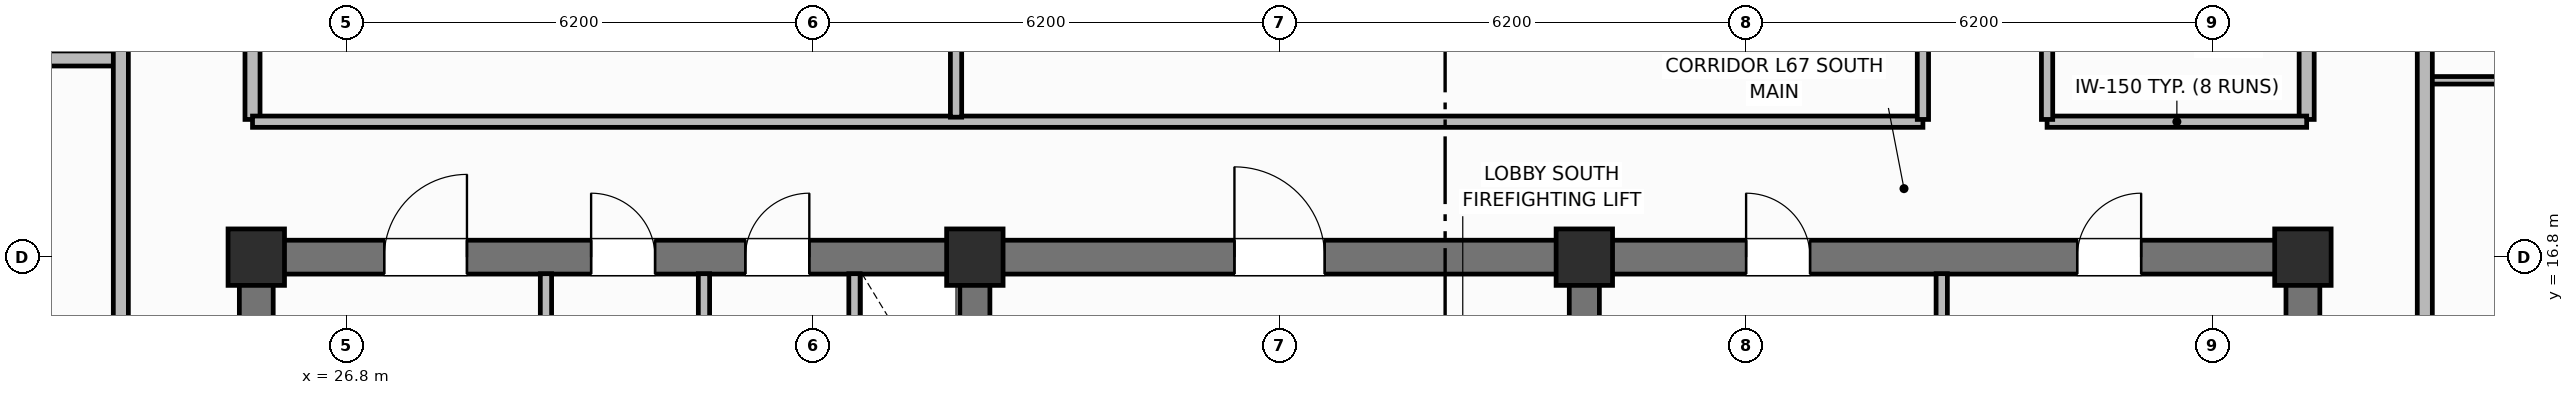
"""IFC4 building model, lengths in metres.
Left out: names, types, materials, properties, quantities, classifications, styles, units other than length and angle.
Written with IfcOpenShell. Run it as: python <this file> out.ifc"""

import sys

from ifc_helpers import new_model, si_unit, direction, frame, frame_2d, origin, origin_2d, place, context, subcontext, project, spatial, rectangle, extrude, element, fill, save


model = new_model("IFC4")
c1 = context("Model", 3, precision=1e-05, world=origin(), true_north=direction((0.0, 1.0)))
c2 = subcontext(c1, "Body", "Model", "MODEL_VIEW")
j1 = project(units=[si_unit("LENGTHUNIT", "METRE"), si_unit("PLANEANGLEUNIT", "RADIAN")], contexts=[c1])
p1 = place(None, origin())
s1 = spatial("IfcSite", under=j1, at=p1, CompositionType="ELEMENT")
p2 = place(p1, origin())
s2 = spatial("IfcBuilding", under=s1, at=p2, CompositionType="ELEMENT")
p3 = place(p2, frame((0.0, 0.0, 267.6)))
s3 = spatial("IfcBuildingStorey", under=s2, at=p3, CompositionType="ELEMENT", Elevation=267.6)
for number, where, z_axis, x_axis in (
    (1, (25.6, 10.825, 0.0), (0.0, 0.0, 1.0), (0.0, 1.0, 0.0)),
    (2, (52.8, 10.825, 0.0), (0.0, 0.0, 1.0), (0.0, 1.0, 0.0)),
):
    element("IfcWall", number, at=place(p3, frame(where, z_axis=z_axis, x_axis=x_axis)), inside=s3, PredefinedType="SHEAR", context=c2, shape_type="SweptSolid", body=[
        extrude(rectangle(XDim=5.75, YDim=0.45, at=frame_2d((2.875, 0.0))), origin(), (0.0, 0.0, 1.0), 3.7),
    ])
p4 = place(p3, frame((25.6, 16.8, 0.0), z_axis=(0.0, 0.0, 1.0), x_axis=(1.0, 0.0, 0.0)))
e3 = element("IfcWall", 3, at=p4, inside=s3, PredefinedType="SHEAR", context=c2, shape_type="SweptSolid", body=[
    extrude(rectangle(XDim=27.2, YDim=0.45, at=frame_2d((13.6, 0.0))), origin(), (0.0, 0.0, 1.0), 3.7),
])
p5 = place(p4, frame((1.7, 0.0, 0.0)))
e4 = element("IfcOpeningElement", 4, at=p5, cuts=e3, PredefinedType="OPENING", context=c2, shape_type="SweptSolid", body=[
    extrude(rectangle(XDim=1.1, YDim=2.15, at=frame_2d((0.55, 1.075))), frame((0.0, 0.235, 0.0), z_axis=(0.0, -1.0, 0.0), x_axis=(1.0, 0.0, 0.0)), (0.0, 0.0, 1.0), 0.47),
])
p6 = place(p4, frame((4.45, 0.0, 0.0)))
e5 = element("IfcOpeningElement", 5, at=p6, cuts=e3, PredefinedType="OPENING", context=c2, shape_type="SweptSolid", body=[
    extrude(rectangle(XDim=0.85, YDim=2.1, at=frame_2d((0.425, 1.05))), frame((0.0, 0.235, 0.0), z_axis=(0.0, -1.0, 0.0), x_axis=(1.0, 0.0, 0.0)), (0.0, 0.0, 1.0), 0.47),
])
p7 = place(p4, frame((6.5, 0.0, 0.0)))
e6 = element("IfcOpeningElement", 6, at=p7, cuts=e3, PredefinedType="OPENING", context=c2, shape_type="SweptSolid", body=[
    extrude(rectangle(XDim=0.85, YDim=2.1, at=frame_2d((0.425, 1.05))), frame((0.0, 0.235, 0.0), z_axis=(0.0, -1.0, 0.0), x_axis=(1.0, 0.0, 0.0)), (0.0, 0.0, 1.0), 0.47),
])
p8 = place(p4, frame((13.0, 0.0, 0.0)))
e7 = element("IfcOpeningElement", 7, at=p8, cuts=e3, PredefinedType="OPENING", context=c2, shape_type="SweptSolid", body=[
    extrude(rectangle(XDim=1.2, YDim=2.15, at=frame_2d((0.6, 1.075))), frame((0.0, 0.235, 0.0), z_axis=(0.0, -1.0, 0.0), x_axis=(1.0, 0.0, 0.0)), (0.0, 0.0, 1.0), 0.47),
])
p9 = place(p4, frame((19.8, 0.0, 0.0)))
e8 = element("IfcOpeningElement", 8, at=p9, cuts=e3, PredefinedType="OPENING", context=c2, shape_type="SweptSolid", body=[
    extrude(rectangle(XDim=0.85, YDim=2.1, at=frame_2d((0.425, 1.05))), frame((0.0, 0.235, 0.0), z_axis=(0.0, -1.0, 0.0), x_axis=(1.0, 0.0, 0.0)), (0.0, 0.0, 1.0), 0.47),
])
p10 = place(p4, frame((24.2, 0.0, 0.0)))
e9 = element("IfcOpeningElement", 9, at=p10, cuts=e3, PredefinedType="OPENING", context=c2, shape_type="SweptSolid", body=[
    extrude(rectangle(XDim=0.85, YDim=2.1, at=frame_2d((0.425, 1.05))), frame((0.0, 0.235, 0.0), z_axis=(0.0, -1.0, 0.0), x_axis=(1.0, 0.0, 0.0)), (0.0, 0.0, 1.0), 0.47),
])
for number, where, z_axis, x_axis in (
    (10, (35.15, 10.825, 0.0), (0.0, 0.0, 1.0), (0.0, 1.0, 0.0)),
    (11, (43.25, 10.825, 0.0), (0.0, 0.0, 1.0), (0.0, 1.0, 0.0)),
):
    element("IfcWall", number, at=place(p3, frame(where, z_axis=z_axis, x_axis=x_axis)), inside=s3, PredefinedType="SHEAR", context=c2, shape_type="SweptSolid", body=[
        extrude(rectangle(XDim=5.75, YDim=0.4, at=frame_2d((2.875, 0.0))), origin(), (0.0, 0.0, 1.0), 3.7),
    ])
for number, where, z_axis, x_axis in (
    (12, (25.6, 16.8, 0.0), (0.0, 0.0, 1.0), (1.0, 0.0, 0.0)),
    (13, (35.15, 16.8, 0.0), (0.0, 0.0, 1.0), (1.0, 0.0, 0.0)),
    (14, (43.25, 16.8, 0.0), (0.0, 0.0, 1.0), (1.0, 0.0, 0.0)),
    (15, (52.8, 16.8, 0.0), (0.0, 0.0, 1.0), (1.0, 0.0, 0.0)),
):
    element("IfcColumn", number, at=place(p3, frame(where, z_axis=z_axis, x_axis=x_axis)), inside=s3, PredefinedType="COLUMN", context=c2, shape_type="SweptSolid", body=[
        extrude(rectangle(XDim=0.75, YDim=0.75, at=origin_2d()), origin(), (0.0, 0.0, 1.0), 3.7),
    ])
for number, where, z_axis, x_axis in (
    (16, (29.45, 14.5, 0.0), (0.0, 0.0, 1.0), (0.0, 1.0, 0.0)),
    (17, (31.55, 14.5, 0.0), (0.0, 0.0, 1.0), (0.0, 1.0, 0.0)),
):
    element("IfcWall", number, at=place(p3, frame(where, z_axis=z_axis, x_axis=x_axis)), inside=s3, PredefinedType="PARTITIONING", context=c2, shape_type="SweptSolid", body=[
        extrude(rectangle(XDim=2.08, YDim=0.15, at=frame_2d((1.04, 0.0))), origin(), (0.0, 0.0, 1.0), 2.56),
    ])
p11 = place(p3, frame((33.55, 14.5, 0.0), z_axis=(0.0, 0.0, 1.0), x_axis=(0.0, 1.0, 0.0)))
e18 = element("IfcWall", 18, at=p11, inside=s3, PredefinedType="PARTITIONING", context=c2, shape_type="SweptSolid", body=[
    extrude(rectangle(XDim=2.08, YDim=0.15, at=frame_2d((1.04, 0.0))), origin(), (0.0, 0.0, 1.0), 2.56),
])
p12 = place(p11, frame((0.55, 0.0, 0.0)))
e19 = element("IfcOpeningElement", 19, at=p12, cuts=e18, PredefinedType="OPENING", context=c2, shape_type="SweptSolid", body=[
    extrude(rectangle(XDim=0.85, YDim=2.05, at=frame_2d((0.425, 1.025))), frame((0.0, 0.085, 0.0), z_axis=(0.0, -1.0, 0.0), x_axis=(1.0, 0.0, 0.0)), (0.0, 0.0, 1.0), 0.17),
])
p13 = place(p3, frame((48.0, 10.95, 0.0), z_axis=(0.0, 0.0, 1.0), x_axis=(0.0, 1.0, 0.0)))
e20 = element("IfcWall", 20, at=p13, inside=s3, PredefinedType="PARTITIONING", context=c2, shape_type="SweptSolid", body=[
    extrude(rectangle(XDim=5.63, YDim=0.15, at=frame_2d((2.815, 0.0))), origin(), (0.0, 0.0, 1.0), 2.56),
])
for number, where, z_axis, x_axis in (
    (21, (25.55, 18.63, 0.0), (0.0, 0.0, 1.0), (0.0, 1.0, 0.0)),
    (22, (52.85, 18.63, 0.0), (0.0, 0.0, 1.0), (0.0, 1.0, 0.0)),
):
    element("IfcWall", number, at=place(p3, frame(where, z_axis=z_axis, x_axis=x_axis)), inside=s3, PredefinedType="PARTITIONING", context=c2, shape_type="SweptSolid", body=[
        extrude(rectangle(XDim=19.14, YDim=0.2, at=frame_2d((9.57, 0.0))), origin(), (0.0, 0.0, 1.0), 2.56),
    ])
p14 = place(p3, frame((25.55, 18.6, 0.0), z_axis=(0.0, 0.0, 1.0), x_axis=(1.0, 0.0, 0.0)))
e23 = element("IfcWall", 23, at=p14, inside=s3, PredefinedType="PARTITIONING", context=c2, shape_type="SweptSolid", body=[
    extrude(rectangle(XDim=22.2, YDim=0.15, at=frame_2d((11.1, 0.0))), origin(), (0.0, 0.0, 1.0), 2.56),
])
p15 = place(p3, frame((49.4, 18.6, 0.0), z_axis=(0.0, 0.0, 1.0), x_axis=(1.0, 0.0, 0.0)))
e24 = element("IfcWall", 24, at=p15, inside=s3, PredefinedType="PARTITIONING", context=c2, shape_type="SweptSolid", body=[
    extrude(rectangle(XDim=3.45, YDim=0.15, at=frame_2d((1.725, 0.0))), origin(), (0.0, 0.0, 1.0), 2.56),
])
p16 = place(p3, frame((34.9, 18.66, 0.0), z_axis=(0.0, 0.0, 1.0), x_axis=(0.0, 1.0, 0.0)))
e25 = element("IfcWall", 25, at=p16, inside=s3, PredefinedType="PARTITIONING", context=c2, shape_type="SweptSolid", body=[
    extrude(rectangle(XDim=19.08, YDim=0.15, at=frame_2d((9.54, 0.0))), origin(), (0.0, 0.0, 1.0), 2.56),
])
p17 = place(p16, frame((5.0, 0.0, 0.0)))
e26 = element("IfcOpeningElement", 26, at=p17, cuts=e25, PredefinedType="OPENING", context=c2, shape_type="SweptSolid", body=[
    extrude(rectangle(XDim=1.0, YDim=2.15, at=frame_2d((0.5, 1.075))), frame((0.0, 0.085, 0.0), z_axis=(0.0, -1.0, 0.0), x_axis=(1.0, 0.0, 0.0)), (0.0, 0.0, 1.0), 0.17),
])
p18 = place(p3, frame((47.75, 18.63, 0.0), z_axis=(0.0, 0.0, 1.0), x_axis=(0.0, 1.0, 0.0)))
e27 = element("IfcWall", 27, at=p18, inside=s3, PredefinedType="PARTITIONING", context=c2, shape_type="SweptSolid", body=[
    extrude(rectangle(XDim=19.14, YDim=0.15, at=frame_2d((9.57, 0.0))), origin(), (0.0, 0.0, 1.0), 2.56),
])
p19 = place(p18, frame((2.4, 0.0, 0.0)))
e28 = element("IfcOpeningElement", 28, at=p19, cuts=e27, PredefinedType="OPENING", context=c2, shape_type="SweptSolid", body=[
    extrude(rectangle(XDim=0.9, YDim=2.1, at=frame_2d((0.45, 1.05))), frame((0.0, 0.085, 0.0), z_axis=(0.0, -1.0, 0.0), x_axis=(1.0, 0.0, 0.0)), (0.0, 0.0, 1.0), 0.17),
])
p20 = place(p18, frame((10.804, 0.0, 0.0)))
e29 = element("IfcOpeningElement", 29, at=p20, cuts=e27, PredefinedType="OPENING", context=c2, shape_type="SweptSolid", body=[
    extrude(rectangle(XDim=0.9, YDim=2.1, at=frame_2d((0.45, 1.05))), frame((0.0, 0.085, 0.0), z_axis=(0.0, -1.0, 0.0), x_axis=(1.0, 0.0, 0.0)), (0.0, 0.0, 1.0), 0.17),
])
p21 = place(p3, frame((49.4, 18.63, 0.0), z_axis=(0.0, 0.0, 1.0), x_axis=(0.0, 1.0, 0.0)))
e30 = element("IfcWall", 30, at=p21, inside=s3, PredefinedType="PARTITIONING", context=c2, shape_type="SweptSolid", body=[
    extrude(rectangle(XDim=19.14, YDim=0.15, at=frame_2d((9.57, 0.0))), origin(), (0.0, 0.0, 1.0), 2.56),
])
p22 = place(p21, frame((2.4, 0.0, 0.0)))
e31 = element("IfcOpeningElement", 31, at=p22, cuts=e30, PredefinedType="OPENING", context=c2, shape_type="SweptSolid", body=[
    extrude(rectangle(XDim=1.0, YDim=2.15, at=frame_2d((0.5, 1.075))), frame((0.0, 0.085, 0.0), z_axis=(0.0, -1.0, 0.0), x_axis=(1.0, 0.0, 0.0)), (0.0, 0.0, 1.0), 0.17),
])
p23 = place(p21, frame((10.804, 0.0, 0.0)))
e32 = element("IfcOpeningElement", 32, at=p23, cuts=e30, PredefinedType="OPENING", context=c2, shape_type="SweptSolid", body=[
    extrude(rectangle(XDim=1.0, YDim=2.15, at=frame_2d((0.5, 1.075))), frame((0.0, 0.085, 0.0), z_axis=(0.0, -1.0, 0.0), x_axis=(1.0, 0.0, 0.0)), (0.0, 0.0, 1.0), 0.17),
])
p24 = place(p3, frame((19.53, 19.44, 0.0), z_axis=(0.0, 0.0, 1.0), x_axis=(1.0, 0.0, 0.0)))
e33 = element("IfcWall", 33, at=p24, inside=s3, PredefinedType="PARTITIONING", context=c2, shape_type="SweptSolid", body=[
    extrude(rectangle(XDim=4.27, YDim=0.2, at=frame_2d((2.135, 0.0))), origin(), (0.0, 0.0, 1.0), 2.56),
])
p25 = place(p3, frame((23.8, 9.95, 0.0), z_axis=(0.0, 0.0, 1.0), x_axis=(0.0, 1.0, 0.0)))
e34 = element("IfcWall", 34, at=p25, inside=s3, PredefinedType="PARTITIONING", context=c2, shape_type="SweptSolid", body=[
    extrude(rectangle(XDim=36.5, YDim=0.2, at=frame_2d((18.25, 0.0))), origin(), (0.0, 0.0, 1.0), 2.56),
])
p26 = place(p25, frame((3.11, 0.0, 0.0)))
e35 = element("IfcOpeningElement", 35, at=p26, cuts=e34, PredefinedType="OPENING", context=c2, shape_type="SweptSolid", body=[
    extrude(rectangle(XDim=1.0, YDim=2.15, at=frame_2d((0.5, 1.075))), frame((0.0, 0.11, 0.0), z_axis=(0.0, -1.0, 0.0), x_axis=(1.0, 0.0, 0.0)), (0.0, 0.0, 1.0), 0.22),
])
p27 = place(p25, frame((11.99, 0.0, 0.0)))
e36 = element("IfcOpeningElement", 36, at=p27, cuts=e34, PredefinedType="OPENING", context=c2, shape_type="SweptSolid", body=[
    extrude(rectangle(XDim=1.0, YDim=2.15, at=frame_2d((0.5, 1.075))), frame((0.0, 0.11, 0.0), z_axis=(0.0, -1.0, 0.0), x_axis=(1.0, 0.0, 0.0)), (0.0, 0.0, 1.0), 0.22),
])
p28 = place(p25, frame((23.5, 0.0, 0.0)))
e37 = element("IfcOpeningElement", 37, at=p28, cuts=e34, PredefinedType="OPENING", context=c2, shape_type="SweptSolid", body=[
    extrude(rectangle(XDim=1.0, YDim=2.15, at=frame_2d((0.5, 1.075))), frame((0.0, 0.11, 0.0), z_axis=(0.0, -1.0, 0.0), x_axis=(1.0, 0.0, 0.0)), (0.0, 0.0, 1.0), 0.22),
])
p29 = place(p25, frame((31.2, 0.0, 0.0)))
e38 = element("IfcOpeningElement", 38, at=p29, cuts=e34, PredefinedType="OPENING", context=c2, shape_type="SweptSolid", body=[
    extrude(rectangle(XDim=1.0, YDim=2.15, at=frame_2d((0.5, 1.075))), frame((0.0, 0.11, 0.0), z_axis=(0.0, -1.0, 0.0), x_axis=(1.0, 0.0, 0.0)), (0.0, 0.0, 1.0), 0.22),
])
p30 = place(p3, frame((54.42, 19.15, 0.0), z_axis=(0.0, 0.0, 1.0), x_axis=(1.0, 0.0, 0.0)))
e39 = element("IfcWall", 39, at=p30, inside=s3, PredefinedType="PARTITIONING", context=c2, shape_type="SweptSolid", body=[
    extrude(rectangle(XDim=1.95, YDim=0.1, at=frame_2d((0.975, 0.0))), origin(), (0.0, 0.0, 1.0), 2.56),
])
p31 = place(p3, frame((54.42, 9.95, 0.0), z_axis=(0.0, 0.0, 1.0), x_axis=(0.0, 1.0, 0.0)))
e40 = element("IfcWall", 40, at=p31, inside=s3, PredefinedType="PARTITIONING", context=c2, shape_type="SweptSolid", body=[
    extrude(rectangle(XDim=36.5, YDim=0.2, at=frame_2d((18.25, 0.0))), origin(), (0.0, 0.0, 1.0), 2.56),
])
p32 = place(p31, frame((3.25, 0.0, 0.0)))
e41 = element("IfcOpeningElement", 41, at=p32, cuts=e40, PredefinedType="OPENING", context=c2, shape_type="SweptSolid", body=[
    extrude(rectangle(XDim=1.0, YDim=2.15, at=frame_2d((0.5, 1.075))), frame((0.0, 0.11, 0.0), z_axis=(0.0, -1.0, 0.0), x_axis=(1.0, 0.0, 0.0)), (0.0, 0.0, 1.0), 0.22),
])
p33 = place(p31, frame((14.25, 0.0, 0.0)))
e42 = element("IfcOpeningElement", 42, at=p33, cuts=e40, PredefinedType="OPENING", context=c2, shape_type="SweptSolid", body=[
    extrude(rectangle(XDim=1.0, YDim=2.15, at=frame_2d((0.5, 1.075))), frame((0.0, 0.11, 0.0), z_axis=(0.0, -1.0, 0.0), x_axis=(1.0, 0.0, 0.0)), (0.0, 0.0, 1.0), 0.22),
])
p34 = place(p5, origin())
e43 = element("IfcDoor", 43, at=p34, inside=s3, OperationType="SINGLE_SWING_RIGHT", PredefinedType="DOOR", context=c2, shape_type="SweptSolid", body=[
    extrude(rectangle(XDim=1.1, YDim=2.15, at=frame_2d((0.55, 1.075))), frame((0.0, 0.025, 0.0), z_axis=(0.0, -1.0, 0.0), x_axis=(1.0, 0.0, 0.0)), (0.0, 0.0, 1.0), 0.05),
])
fill(e4, e43)
p35 = place(p6, origin())
e44 = element("IfcDoor", 44, at=p35, inside=s3, OperationType="SINGLE_SWING_LEFT", PredefinedType="DOOR", context=c2, shape_type="SweptSolid", body=[
    extrude(rectangle(XDim=0.85, YDim=2.1, at=frame_2d((0.425, 1.05))), frame((0.0, 0.025, 0.0), z_axis=(0.0, -1.0, 0.0), x_axis=(1.0, 0.0, 0.0)), (0.0, 0.0, 1.0), 0.05),
])
fill(e5, e44)
p36 = place(p7, origin())
e45 = element("IfcDoor", 45, at=p36, inside=s3, OperationType="SINGLE_SWING_RIGHT", PredefinedType="DOOR", context=c2, shape_type="SweptSolid", body=[
    extrude(rectangle(XDim=0.85, YDim=2.1, at=frame_2d((0.425, 1.05))), frame((0.0, 0.025, 0.0), z_axis=(0.0, -1.0, 0.0), x_axis=(1.0, 0.0, 0.0)), (0.0, 0.0, 1.0), 0.05),
])
fill(e6, e45)
p37 = place(p8, origin())
e46 = element("IfcDoor", 46, at=p37, inside=s3, OperationType="SINGLE_SWING_LEFT", PredefinedType="DOOR", context=c2, shape_type="SweptSolid", body=[
    extrude(rectangle(XDim=1.2, YDim=2.15, at=frame_2d((0.6, 1.075))), frame((0.0, 0.025, 0.0), z_axis=(0.0, -1.0, 0.0), x_axis=(1.0, 0.0, 0.0)), (0.0, 0.0, 1.0), 0.05),
])
fill(e7, e46)
p38 = place(p9, origin())
e47 = element("IfcDoor", 47, at=p38, inside=s3, OperationType="SINGLE_SWING_LEFT", PredefinedType="DOOR", context=c2, shape_type="SweptSolid", body=[
    extrude(rectangle(XDim=0.85, YDim=2.1, at=frame_2d((0.425, 1.05))), frame((0.0, 0.025, 0.0), z_axis=(0.0, -1.0, 0.0), x_axis=(1.0, 0.0, 0.0)), (0.0, 0.0, 1.0), 0.05),
])
fill(e8, e47)
p39 = place(p10, origin())
e48 = element("IfcDoor", 48, at=p39, inside=s3, OperationType="SINGLE_SWING_RIGHT", PredefinedType="DOOR", context=c2, shape_type="SweptSolid", body=[
    extrude(rectangle(XDim=0.85, YDim=2.1, at=frame_2d((0.425, 1.05))), frame((0.0, 0.025, 0.0), z_axis=(0.0, -1.0, 0.0), x_axis=(1.0, 0.0, 0.0)), (0.0, 0.0, 1.0), 0.05),
])
fill(e9, e48)
save(model, sys.argv[1])
